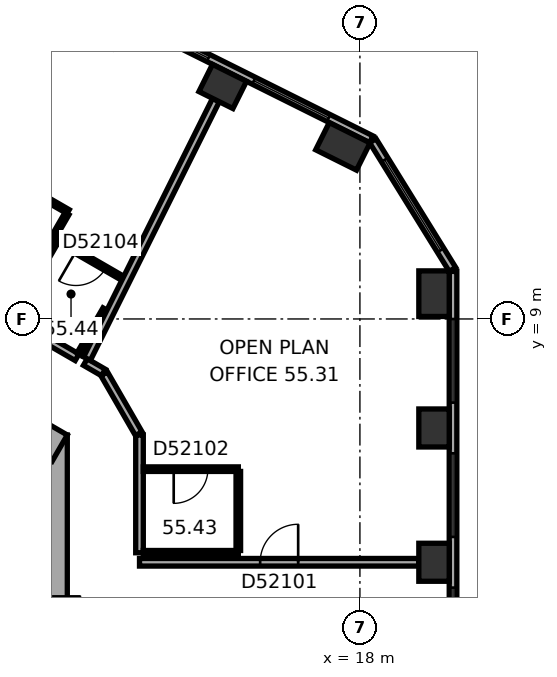
"""IFC4 building model, lengths in metres.
Left out: names, types, materials, properties, quantities, classifications, styles, units other than length and angle.
Written with IfcOpenShell. Run it as: python <this file> out.ifc"""

import sys

from ifc_helpers import new_model, si_unit, direction, frame, frame_2d, origin, origin_2d, place, context, subcontext, project, spatial, rectangle, extrude, element, fill, save


model = new_model("IFC4")
c1 = context("Model", 3, precision=1e-05, world=origin(), true_north=direction((0.0, 1.0)))
c2 = subcontext(c1, "Body", "Model", "MODEL_VIEW")
j1 = project(units=[si_unit("LENGTHUNIT", "METRE"), si_unit("PLANEANGLEUNIT", "RADIAN")], contexts=[c1])
p1 = place(None, origin())
s1 = spatial("IfcSite", under=j1, at=p1, CompositionType="ELEMENT")
p2 = place(p1, origin())
s2 = spatial("IfcBuilding", under=s1, at=p2, CompositionType="ELEMENT")
p3 = place(p2, frame((0.0, 0.0, 225.4)))
s3 = spatial("IfcBuildingStorey", under=s2, at=p3, CompositionType="ELEMENT", Elevation=225.4)
for number, where, z_axis, x_axis in (
    (1, (19.95, 2.598, 0.0), (0.0, 0.0, 1.0), (0.0, 1.0, 0.0)),
    (2, (19.95, 6.132, 0.0), (0.0, 0.0, 1.0), (0.0, 1.0, 0.0)),
):
    element("IfcColumn", number, at=place(p3, frame(where, z_axis=z_axis, x_axis=x_axis)), inside=s3, PredefinedType="COLUMN", context=c2, shape_type="SweptSolid", body=[
        extrude(rectangle(XDim=1.0, YDim=0.8, at=origin_2d()), origin(), (0.0, 0.0, 1.0), 3.7),
    ])
for number, where, z_axis, x_axis in (
    (3, (19.95, 9.665, 0.0), (0.0, 0.0, 1.0), (0.0, 1.0, 0.0)),
    (4, (17.552, 13.541, 0.0), (0.0, 0.0, 1.0), (-0.895, 0.446, 0.0)),
):
    element("IfcColumn", number, at=place(p3, frame(where, z_axis=z_axis, x_axis=x_axis)), inside=s3, PredefinedType="COLUMN", context=c2, shape_type="SweptSolid", body=[
        extrude(rectangle(XDim=1.2, YDim=0.8, at=origin_2d()), origin(), (0.0, 0.0, 1.0), 3.7),
    ])
p4 = place(p3, frame((14.389, 15.118, 0.0), z_axis=(0.0, 0.0, 1.0), x_axis=(-0.894934361602, 0.44619781311, 0.0)))
e5 = element("IfcColumn", 5, at=p4, inside=s3, PredefinedType="COLUMN", context=c2, shape_type="SweptSolid", body=[
    extrude(rectangle(XDim=1.0, YDim=0.8, at=origin_2d()), origin(), (0.0, 0.0, 1.0), 3.7),
])
p5 = place(p3, frame((9.9, -5.947, 0.0), z_axis=(0.0, 0.0, 1.0), x_axis=(0.0, 1.0, 0.0)))
e6 = element("IfcWall", 6, at=p5, inside=s3, PredefinedType="SHEAR", context=c2, shape_type="SweptSolid", body=[
    extrude(rectangle(XDim=11.894, YDim=0.8, at=frame_2d((5.947, 0.0))), origin(), (0.0, 0.0, 1.0), 3.7),
])
p6 = place(p5, frame((6.147, 0.0, 0.0)))
e7 = element("IfcOpeningElement", 7, at=p6, cuts=e6, PredefinedType="OPENING", context=c2, shape_type="SweptSolid", body=[
    extrude(rectangle(XDim=1.5, YDim=2.1, at=frame_2d((0.75, 1.05))), frame((0.0, 0.41, 0.0), z_axis=(0.0, -1.0, 0.0), x_axis=(1.0, 0.0, 0.0)), (0.0, 0.0, 1.0), 0.82),
])
p7 = place(p5, frame((2.997, 0.0, 0.0)))
e8 = element("IfcOpeningElement", 8, at=p7, cuts=e6, PredefinedType="OPENING", context=c2, shape_type="SweptSolid", body=[
    extrude(rectangle(XDim=0.9, YDim=2.1, at=frame_2d((0.45, 1.05))), frame((0.0, 0.41, 0.0), z_axis=(0.0, -1.0, 0.0), x_axis=(1.0, 0.0, 0.0)), (0.0, 0.0, 1.0), 0.82),
])
p8 = place(p3, frame((10.1, 5.6, 0.0), z_axis=(0.0, 0.0, 1.0), x_axis=(-0.866023897231, 0.500002609418, 0.0)))
e9 = element("IfcWall", 9, at=p8, inside=s3, PredefinedType="SHEAR", context=c2, shape_type="SweptSolid", body=[
    extrude(rectangle(XDim=11.894, YDim=0.8, at=frame_2d((5.947, 0.0))), origin(), (0.0, 0.0, 1.0), 3.7),
])
p9 = place(p8, frame((3.897, 0.0, 0.0)))
e10 = element("IfcOpeningElement", 10, at=p9, cuts=e9, PredefinedType="OPENING", context=c2, shape_type="SweptSolid", body=[
    extrude(rectangle(XDim=0.9, YDim=2.1, at=frame_2d((0.45, 1.05))), frame((0.0, 0.41, 0.0), z_axis=(0.0, -1.0, 0.0), x_axis=(1.0, 0.0, 0.0)), (0.0, 0.0, 1.0), 0.82),
])
p10 = place(p8, frame((7.797, 0.0, 0.0)))
e11 = element("IfcOpeningElement", 11, at=p10, cuts=e9, PredefinedType="OPENING", context=c2, shape_type="SweptSolid", body=[
    extrude(rectangle(XDim=0.9, YDim=2.1, at=frame_2d((0.45, 1.05))), frame((0.0, 0.41, 0.0), z_axis=(0.0, -1.0, 0.0), x_axis=(1.0, 0.0, 0.0)), (0.0, 0.0, 1.0), 0.82),
])
p11 = place(p3, frame((20.45, -8.59, 0.0), z_axis=(0.0, 0.0, 1.0), x_axis=(0.0, 1.0, 0.0)))
e12 = element("IfcWall", 12, at=p11, inside=s3, PredefinedType="STANDARD", context=c2, shape_type="SweptSolid", body=[
    extrude(rectangle(XDim=18.841, YDim=0.2, at=frame_2d((9.421, 0.0))), origin(), (0.0, 0.0, 1.0), 3.7),
])
p12 = place(p11, frame((1.254, 0.0, 0.9)))
e13 = element("IfcOpeningElement", 13, at=p12, cuts=e12, PredefinedType="OPENING", context=c2, shape_type="SweptSolid", body=[
    extrude(rectangle(XDim=2.2, YDim=2.0, at=frame_2d((1.1, 1.0))), frame((0.0, 0.11, 0.0), z_axis=(0.0, -1.0, 0.0), x_axis=(1.0, 0.0, 0.0)), (0.0, 0.0, 1.0), 0.22),
])
p13 = place(p11, frame((4.788, 0.0, 0.9)))
e14 = element("IfcOpeningElement", 14, at=p13, cuts=e12, PredefinedType="OPENING", context=c2, shape_type="SweptSolid", body=[
    extrude(rectangle(XDim=2.2, YDim=2.0, at=frame_2d((1.1, 1.0))), frame((0.0, 0.11, 0.0), z_axis=(0.0, -1.0, 0.0), x_axis=(1.0, 0.0, 0.0)), (0.0, 0.0, 1.0), 0.22),
])
p14 = place(p11, frame((8.322, 0.0, 0.9)))
e15 = element("IfcOpeningElement", 15, at=p14, cuts=e12, PredefinedType="OPENING", context=c2, shape_type="SweptSolid", body=[
    extrude(rectangle(XDim=2.2, YDim=2.0, at=frame_2d((1.1, 1.0))), frame((0.0, 0.11, 0.0), z_axis=(0.0, -1.0, 0.0), x_axis=(1.0, 0.0, 0.0)), (0.0, 0.0, 1.0), 0.22),
])
p15 = place(p11, frame((11.855, 0.0, 0.9)))
e16 = element("IfcOpeningElement", 16, at=p15, cuts=e12, PredefinedType="OPENING", context=c2, shape_type="SweptSolid", body=[
    extrude(rectangle(XDim=2.2, YDim=2.0, at=frame_2d((1.1, 1.0))), frame((0.0, 0.11, 0.0), z_axis=(0.0, -1.0, 0.0), x_axis=(1.0, 0.0, 0.0)), (0.0, 0.0, 1.0), 0.22),
])
p16 = place(p11, frame((15.389, 0.0, 0.9)))
e17 = element("IfcOpeningElement", 17, at=p16, cuts=e12, PredefinedType="OPENING", context=c2, shape_type="SweptSolid", body=[
    extrude(rectangle(XDim=2.2, YDim=2.0, at=frame_2d((1.1, 1.0))), frame((0.0, 0.11, 0.0), z_axis=(0.0, -1.0, 0.0), x_axis=(1.0, 0.0, 0.0)), (0.0, 0.0, 1.0), 0.22),
])
p17 = place(p3, frame((20.435, 10.304, 0.0), z_axis=(0.0, 0.0, 1.0), x_axis=(-0.526202661606, 0.850359194058, 0.0)))
e18 = element("IfcWall", 18, at=p17, inside=s3, PredefinedType="STANDARD", context=c2, shape_type="SweptSolid", body=[
    extrude(rectangle(XDim=3.983, YDim=0.2, at=frame_2d((1.991, 0.0))), origin(), (0.0, 0.0, 1.0), 3.7),
])
p18 = place(p17, frame((0.591, 0.0, 0.9)))
e19 = element("IfcOpeningElement", 19, at=p18, cuts=e18, PredefinedType="OPENING", context=c2, shape_type="SweptSolid", body=[
    extrude(rectangle(XDim=2.8, YDim=2.0, at=frame_2d((1.4, 1.0))), frame((0.0, 0.11, 0.0), z_axis=(0.0, -1.0, 0.0), x_axis=(1.0, 0.0, 0.0)), (0.0, 0.0, 1.0), 0.22),
])
p19 = place(p3, frame((18.299, 13.727, 0.0), z_axis=(0.0, 0.0, 1.0), x_axis=(-0.894934554817, 0.44619742558, 0.0)))
e20 = element("IfcWall", 20, at=p19, inside=s3, PredefinedType="STANDARD", context=c2, shape_type="SweptSolid", body=[
    extrude(rectangle(XDim=18.841, YDim=0.2, at=frame_2d((9.421, 0.0))), origin(), (0.0, 0.0, 1.0), 3.7),
])
p20 = place(p19, frame((1.253, 0.0, 0.9)))
e21 = element("IfcOpeningElement", 21, at=p20, cuts=e20, PredefinedType="OPENING", context=c2, shape_type="SweptSolid", body=[
    extrude(rectangle(XDim=2.2, YDim=2.0, at=frame_2d((1.1, 1.0))), frame((0.0, 0.11, 0.0), z_axis=(0.0, -1.0, 0.0), x_axis=(1.0, 0.0, 0.0)), (0.0, 0.0, 1.0), 0.22),
])
p21 = place(p19, frame((4.786, 0.0, 0.9)))
e22 = element("IfcOpeningElement", 22, at=p21, cuts=e20, PredefinedType="OPENING", context=c2, shape_type="SweptSolid", body=[
    extrude(rectangle(XDim=2.2, YDim=2.0, at=frame_2d((1.1, 1.0))), frame((0.0, 0.11, 0.0), z_axis=(0.0, -1.0, 0.0), x_axis=(1.0, 0.0, 0.0)), (0.0, 0.0, 1.0), 0.22),
])
p22 = place(p19, frame((8.32, 0.0, 0.9)))
e23 = element("IfcOpeningElement", 23, at=p22, cuts=e20, PredefinedType="OPENING", context=c2, shape_type="SweptSolid", body=[
    extrude(rectangle(XDim=2.2, YDim=2.0, at=frame_2d((1.1, 1.0))), frame((0.0, 0.11, 0.0), z_axis=(0.0, -1.0, 0.0), x_axis=(1.0, 0.0, 0.0)), (0.0, 0.0, 1.0), 0.22),
])
p23 = place(p19, frame((11.854, 0.0, 0.9)))
e24 = element("IfcOpeningElement", 24, at=p23, cuts=e20, PredefinedType="OPENING", context=c2, shape_type="SweptSolid", body=[
    extrude(rectangle(XDim=2.2, YDim=2.0, at=frame_2d((1.1, 1.0))), frame((0.0, 0.11, 0.0), z_axis=(0.0, -1.0, 0.0), x_axis=(1.0, 0.0, 0.0)), (0.0, 0.0, 1.0), 0.22),
])
p24 = place(p19, frame((15.387, 0.0, 0.9)))
e25 = element("IfcOpeningElement", 25, at=p24, cuts=e20, PredefinedType="OPENING", context=c2, shape_type="SweptSolid", body=[
    extrude(rectangle(XDim=2.2, YDim=2.0, at=frame_2d((1.1, 1.0))), frame((0.0, 0.11, 0.0), z_axis=(0.0, -1.0, 0.0), x_axis=(1.0, 0.0, 0.0)), (0.0, 0.0, 1.0), 0.22),
])
p25 = place(p3, frame((7.948, 13.193, 0.0), z_axis=(0.0, 0.0, 1.0), x_axis=(0.866019409031, -0.500010383074, 0.0)))
e26 = element("IfcWall", 26, at=p25, inside=s3, PredefinedType="PARTITIONING", context=c2, shape_type="SweptSolid", body=[
    extrude(rectangle(XDim=2.74, YDim=0.12, at=frame_2d((1.37, 0.0))), origin(), (0.0, 0.0, 1.0), 3.42),
])
p26 = place(p3, frame((8.875, 9.079, 0.0), z_axis=(0.0, 0.0, 1.0), x_axis=(0.499998129301, 0.86602648383, 0.0)))
e27 = element("IfcWall", 27, at=p26, inside=s3, PredefinedType="PARTITIONING", context=c2, shape_type="SweptSolid", body=[
    extrude(rectangle(XDim=2.3, YDim=0.12, at=frame_2d((1.15, 0.0))), origin(), (0.0, 0.0, 1.0), 3.42),
])
p27 = place(p3, frame((10.077, 11.04, 0.0), z_axis=(0.0, 0.0, 1.0), x_axis=(0.866043088465, -0.499969367985, 0.0)))
e28 = element("IfcWall", 28, at=p27, inside=s3, PredefinedType="PARTITIONING", context=c2, shape_type="SweptSolid", body=[
    extrude(rectangle(XDim=1.94, YDim=0.12, at=frame_2d((0.97, 0.0))), origin(), (0.0, 0.0, 1.0), 3.42),
])
p28 = place(p27, frame((0.52, 0.0, 0.0)))
e29 = element("IfcOpeningElement", 29, at=p28, cuts=e28, PredefinedType="OPENING", context=c2, shape_type="SweptSolid", body=[
    extrude(rectangle(XDim=0.9, YDim=2.1, at=frame_2d((0.45, 1.05))), frame((0.0, 0.07, 0.0), z_axis=(0.0, -1.0, 0.0), x_axis=(1.0, 0.0, 0.0)), (0.0, 0.0, 1.0), 0.14),
])
p29 = place(p3, frame((10.292, 11.771, 0.0), z_axis=(0.0, 0.0, 1.0), x_axis=(-0.500026023896, -0.86601037836, 0.0)))
e30 = element("IfcWall", 30, at=p29, inside=s3, PredefinedType="PARTITIONING", context=c2, shape_type="SweptSolid", body=[
    extrude(rectangle(XDim=3.04, YDim=0.12, at=frame_2d((1.52, 0.0))), origin(), (0.0, 0.0, 1.0), 3.42),
])
p30 = place(p3, frame((10.558, 7.992, 0.0), z_axis=(0.0, 0.0, 1.0), x_axis=(-0.866041268327, 0.499972520799, 0.0)))
e31 = element("IfcWall", 31, at=p30, inside=s3, PredefinedType="PARTITIONING", context=c2, shape_type="SweptSolid", body=[
    extrude(rectangle(XDim=2.0, YDim=0.2, at=frame_2d((1.0, 0.0))), origin(), (0.0, 0.0, 1.0), 3.42),
])
p31 = place(p3, frame((11.25, 7.592, 0.0), z_axis=(0.0, 0.0, 1.0), x_axis=(-0.865993292597, 0.500055614084, 0.0)))
e32 = element("IfcWall", 32, at=p31, inside=s3, PredefinedType="PARTITIONING", context=c2, shape_type="SweptSolid", body=[
    extrude(rectangle(XDim=0.55, YDim=0.2, at=frame_2d((0.275, 0.0))), origin(), (0.0, 0.0, 1.0), 3.42),
])
p32 = place(p3, frame((11.291, 9.263, 0.0), z_axis=(0.0, 0.0, 1.0), x_axis=(-0.500036664704, -0.866004234373, 0.0)))
e33 = element("IfcWall", 33, at=p32, inside=s3, PredefinedType="PARTITIONING", context=c2, shape_type="SweptSolid", body=[
    extrude(rectangle(XDim=1.368, YDim=0.12, at=frame_2d((0.684, 0.0))), origin(), (0.0, 0.0, 1.0), 3.42),
])
p33 = place(p3, frame((12.18, 5.981, 0.0), z_axis=(0.0, 0.0, 1.0), x_axis=(-0.499904359745, 0.86608061467, 0.0)))
e34 = element("IfcWall", 34, at=p33, inside=s3, PredefinedType="PARTITIONING", context=c2, shape_type="SweptSolid", body=[
    extrude(rectangle(XDim=1.82, YDim=0.2, at=frame_2d((0.91, 0.0))), origin(), (0.0, 0.0, 1.0), 3.42),
])
p34 = place(p3, frame((12.2, 2.848, 0.0), z_axis=(0.0, 0.0, 1.0), x_axis=(0.0, 1.0, 0.0)))
e35 = element("IfcWall", 35, at=p34, inside=s3, PredefinedType="PARTITIONING", context=c2, shape_type="SweptSolid", body=[
    extrude(rectangle(XDim=3.099, YDim=0.2, at=frame_2d((1.549, 0.0))), origin(), (0.0, 0.0, 1.0), 3.42),
])
p35 = place(p3, frame((12.3, 5.048, 0.0), z_axis=(0.0, 0.0, 1.0), x_axis=(1.0, 0.0, 0.0)))
e36 = element("IfcWall", 36, at=p35, inside=s3, PredefinedType="PARTITIONING", context=c2, shape_type="SweptSolid", body=[
    extrude(rectangle(XDim=2.5, YDim=0.12, at=frame_2d((1.25, 0.0))), origin(), (0.0, 0.0, 1.0), 3.42),
])
p36 = place(p35, frame((0.8, 0.0, 0.0)))
e37 = element("IfcOpeningElement", 37, at=p36, cuts=e36, PredefinedType="OPENING", context=c2, shape_type="SweptSolid", body=[
    extrude(rectangle(XDim=0.9, YDim=2.1, at=frame_2d((0.45, 1.05))), frame((0.0, 0.07, 0.0), z_axis=(0.0, -1.0, 0.0), x_axis=(1.0, 0.0, 0.0)), (0.0, 0.0, 1.0), 0.14),
])
p37 = place(p3, frame((14.211, 14.76, 0.0), z_axis=(0.0, 0.0, 1.0), x_axis=(-0.446198490295, -0.89493402397, 0.0)))
e38 = element("IfcWall", 38, at=p37, inside=s3, PredefinedType="PARTITIONING", context=c2, shape_type="SweptSolid", body=[
    extrude(rectangle(XDim=7.602, YDim=0.2, at=frame_2d((3.801, 0.0))), origin(), (0.0, 0.0, 1.0), 3.42),
])
p38 = place(p3, frame((14.8, 2.848, 0.0), z_axis=(0.0, 0.0, 1.0), x_axis=(-1.0, 0.0, 0.0)))
e39 = element("IfcWall", 39, at=p38, inside=s3, PredefinedType="PARTITIONING", context=c2, shape_type="SweptSolid", body=[
    extrude(rectangle(XDim=2.5, YDim=0.12, at=frame_2d((1.25, 0.0))), origin(), (0.0, 0.0, 1.0), 3.42),
])
p39 = place(p3, frame((14.8, 4.988, 0.0), z_axis=(0.0, 0.0, 1.0), x_axis=(0.0, -1.0, 0.0)))
e40 = element("IfcWall", 40, at=p39, inside=s3, PredefinedType="PARTITIONING", context=c2, shape_type="SweptSolid", body=[
    extrude(rectangle(XDim=2.08, YDim=0.12, at=frame_2d((1.04, 0.0))), origin(), (0.0, 0.0, 1.0), 3.42),
])
p40 = place(p3, frame((19.55, 2.598, 0.0), z_axis=(0.0, 0.0, 1.0), x_axis=(-1.0, 0.0, 0.0)))
e41 = element("IfcWall", 41, at=p40, inside=s3, PredefinedType="PARTITIONING", context=c2, shape_type="SweptSolid", body=[
    extrude(rectangle(XDim=7.35, YDim=0.2, at=frame_2d((3.675, 0.0))), origin(), (0.0, 0.0, 1.0), 3.42),
])
p41 = place(p40, frame((3.175, 0.0, 0.0)))
e42 = element("IfcOpeningElement", 42, at=p41, cuts=e41, PredefinedType="OPENING", context=c2, shape_type="SweptSolid", body=[
    extrude(rectangle(XDim=1.0, YDim=2.1, at=frame_2d((0.5, 1.05))), frame((0.0, 0.11, 0.0), z_axis=(0.0, -1.0, 0.0), x_axis=(1.0, 0.0, 0.0)), (0.0, 0.0, 1.0), 0.22),
])
p42 = place(p14, origin())
e43 = element("IfcWindow", 43, at=p42, inside=s3, PartitioningType="SINGLE_PANEL", PredefinedType="WINDOW", context=c2, shape_type="SweptSolid", body=[
    extrude(rectangle(XDim=2.2, YDim=2.0, at=frame_2d((1.1, 1.0))), frame((0.0, 0.03, 0.0), z_axis=(0.0, -1.0, 0.0), x_axis=(1.0, 0.0, 0.0)), (0.0, 0.0, 1.0), 0.06),
])
fill(e15, e43)
p43 = place(p15, origin())
e44 = element("IfcWindow", 44, at=p43, inside=s3, PartitioningType="SINGLE_PANEL", PredefinedType="WINDOW", context=c2, shape_type="SweptSolid", body=[
    extrude(rectangle(XDim=2.2, YDim=2.0, at=frame_2d((1.1, 1.0))), frame((0.0, 0.03, 0.0), z_axis=(0.0, -1.0, 0.0), x_axis=(1.0, 0.0, 0.0)), (0.0, 0.0, 1.0), 0.06),
])
fill(e16, e44)
p44 = place(p16, origin())
e45 = element("IfcWindow", 45, at=p44, inside=s3, PartitioningType="SINGLE_PANEL", PredefinedType="WINDOW", context=c2, shape_type="SweptSolid", body=[
    extrude(rectangle(XDim=2.2, YDim=2.0, at=frame_2d((1.1, 1.0))), frame((0.0, 0.03, 0.0), z_axis=(0.0, -1.0, 0.0), x_axis=(1.0, 0.0, 0.0)), (0.0, 0.0, 1.0), 0.06),
])
fill(e17, e45)
p45 = place(p18, origin())
e46 = element("IfcWindow", 46, at=p45, inside=s3, PartitioningType="SINGLE_PANEL", PredefinedType="WINDOW", context=c2, shape_type="SweptSolid", body=[
    extrude(rectangle(XDim=2.8, YDim=2.0, at=frame_2d((1.4, 1.0))), frame((0.0, 0.03, 0.0), z_axis=(0.0, -1.0, 0.0), x_axis=(1.0, 0.0, 0.0)), (0.0, 0.0, 1.0), 0.06),
])
fill(e19, e46)
p46 = place(p20, origin())
e47 = element("IfcWindow", 47, at=p46, inside=s3, PartitioningType="SINGLE_PANEL", PredefinedType="WINDOW", context=c2, shape_type="SweptSolid", body=[
    extrude(rectangle(XDim=2.2, YDim=2.0, at=frame_2d((1.1, 1.0))), frame((0.0, 0.03, 0.0), z_axis=(0.0, -1.0, 0.0), x_axis=(1.0, 0.0, 0.0)), (0.0, 0.0, 1.0), 0.06),
])
fill(e21, e47)
p47 = place(p21, origin())
e48 = element("IfcWindow", 48, at=p47, inside=s3, PartitioningType="SINGLE_PANEL", PredefinedType="WINDOW", context=c2, shape_type="SweptSolid", body=[
    extrude(rectangle(XDim=2.2, YDim=2.0, at=frame_2d((1.1, 1.0))), frame((0.0, 0.03, 0.0), z_axis=(0.0, -1.0, 0.0), x_axis=(1.0, 0.0, 0.0)), (0.0, 0.0, 1.0), 0.06),
])
fill(e22, e48)
p48 = place(p6, origin())
e49 = element("IfcDoor", 49, at=p48, inside=s3, OperationType="DOUBLE_DOOR_SINGLE_SWING", PredefinedType="DOOR", context=c2, shape_type="SweptSolid", body=[
    extrude(rectangle(XDim=1.5, YDim=2.1, at=frame_2d((0.75, 1.05))), frame((0.0, 0.025, 0.0), z_axis=(0.0, -1.0, 0.0), x_axis=(1.0, 0.0, 0.0)), (0.0, 0.0, 1.0), 0.05),
])
fill(e7, e49)
p49 = place(p41, origin())
e50 = element("IfcDoor", 50, at=p49, inside=s3, OperationType="SINGLE_SWING_LEFT", PredefinedType="DOOR", context=c2, shape_type="SweptSolid", body=[
    extrude(rectangle(XDim=1.0, YDim=2.1, at=frame_2d((0.5, 1.05))), frame((0.0, 0.025, 0.0), z_axis=(0.0, -1.0, 0.0), x_axis=(1.0, 0.0, 0.0)), (0.0, 0.0, 1.0), 0.05),
])
fill(e42, e50)
p50 = place(p36, origin())
e51 = element("IfcDoor", 51, at=p50, inside=s3, OperationType="SINGLE_SWING_LEFT", PredefinedType="DOOR", context=c2, shape_type="SweptSolid", body=[
    extrude(rectangle(XDim=0.9, YDim=2.1, at=frame_2d((0.45, 1.05))), frame((0.0, 0.025, 0.0), z_axis=(0.0, -1.0, 0.0), x_axis=(1.0, 0.0, 0.0)), (0.0, 0.0, 1.0), 0.05),
])
fill(e37, e51)
p51 = place(p28, origin())
e52 = element("IfcDoor", 52, at=p51, inside=s3, OperationType="SINGLE_SWING_LEFT", PredefinedType="DOOR", context=c2, shape_type="SweptSolid", body=[
    extrude(rectangle(XDim=0.9, YDim=2.1, at=frame_2d((0.45, 1.05))), frame((0.0, 0.025, 0.0), z_axis=(0.0, -1.0, 0.0), x_axis=(1.0, 0.0, 0.0)), (0.0, 0.0, 1.0), 0.05),
])
fill(e29, e52)
save(model, sys.argv[1])
